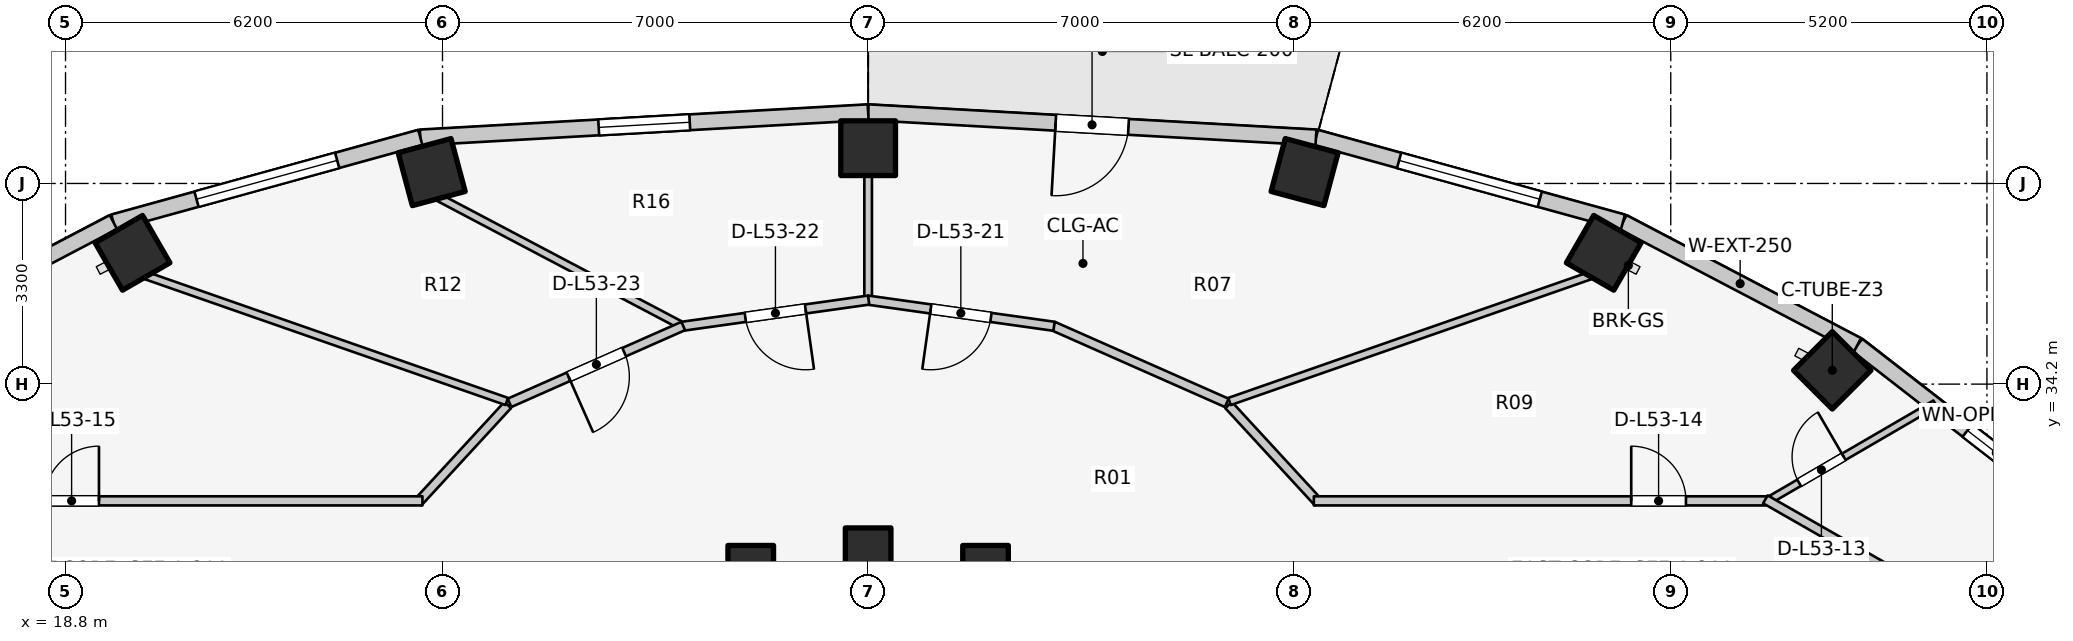
"""IFC4 building model, lengths in metres.
Left out: names, types, materials, properties, quantities, classifications, styles, units other than length and angle.
Written with IfcOpenShell. Run it as: python <this file> out.ifc"""

import sys

from ifc_helpers import new_model, si_unit, direction, frame, frame_2d, origin, origin_2d, place, context, subcontext, project, spatial, rectangle, extrude, element, fill, save


model = new_model("IFC4")
c1 = context("Model", 3, precision=1e-05, world=origin(), true_north=direction((0.0, 1.0)))
c2 = subcontext(c1, "Body", "Model", "MODEL_VIEW")
j1 = project(units=[si_unit("LENGTHUNIT", "METRE"), si_unit("PLANEANGLEUNIT", "RADIAN")], contexts=[c1])
p1 = place(None, origin())
s1 = spatial("IfcSite", under=j1, at=p1, CompositionType="ELEMENT")
p2 = place(p1, origin())
s2 = spatial("IfcBuilding", under=s1, at=p2, CompositionType="ELEMENT")
p3 = place(p2, frame((0.0, 0.0, 174.6)))
s3 = spatial("IfcBuildingStorey", under=s2, at=p3, CompositionType="ELEMENT", Elevation=174.6)
for number, where, z_axis, x_axis in (
    (1, (47.857, 34.427, 0.0), (0.0, 0.0, 1.0), (0.707, 0.707, 0.0)),
    (2, (44.098, 36.359, 0.0), (0.0, 0.0, 1.0), (0.5, 0.866, 0.0)),
):
    element("IfcColumn", number, at=place(p3, frame(where, z_axis=z_axis, x_axis=x_axis)), inside=s3, PredefinedType="COLUMN", context=c2, shape_type="SweptSolid", body=[
        extrude(rectangle(XDim=0.9, YDim=0.9, at=origin_2d()), origin(), (0.0, 0.0, 1.0), 3.1),
    ])
p4 = place(p3, frame((33.931, 31.172, 0.0), z_axis=(0.0, 0.0, 1.0), x_axis=(1.0, 0.0, 0.0)))
e3 = element("IfcColumn", 3, at=p4, inside=s3, PredefinedType="COLUMN", context=c2, shape_type="SweptSolid", body=[
    extrude(rectangle(XDim=0.75, YDim=0.75, at=origin_2d()), origin(), (0.0, 0.0, 1.0), 3.1),
])
p5 = place(p3, frame((39.178, 37.687, 0.0), z_axis=(0.0, 0.0, 1.0), x_axis=(0.258819045103, 0.965925826289, 0.0)))
e4 = element("IfcColumn", 4, at=p5, inside=s3, PredefinedType="COLUMN", context=c2, shape_type="SweptSolid", body=[
    extrude(rectangle(XDim=0.9, YDim=0.9, at=origin_2d()), origin(), (0.0, 0.0, 1.0), 3.1),
])
p6 = place(p3, frame((32.0, 31.46, 0.0), z_axis=(0.0, 0.0, 1.0), x_axis=(1.0, 0.0, 0.0)))
e5 = element("IfcColumn", 5, at=p6, inside=s3, PredefinedType="COLUMN", context=c2, shape_type="SweptSolid", body=[
    extrude(rectangle(XDim=0.75, YDim=0.75, at=origin_2d()), origin(), (0.0, 0.0, 1.0), 3.1),
])
p7 = place(p3, frame((32.0, 38.08, 0.0), z_axis=(0.0, 0.0, 1.0), x_axis=(0.0, 1.0, 0.0)))
e6 = element("IfcColumn", 6, at=p7, inside=s3, PredefinedType="COLUMN", context=c2, shape_type="SweptSolid", body=[
    extrude(rectangle(XDim=0.9, YDim=0.9, at=origin_2d()), origin(), (0.0, 0.0, 1.0), 3.1),
])
p8 = place(p3, frame((30.069, 31.172, 0.0), z_axis=(0.0, 0.0, 1.0), x_axis=(1.0, 0.0, 0.0)))
e7 = element("IfcColumn", 7, at=p8, inside=s3, PredefinedType="COLUMN", context=c2, shape_type="SweptSolid", body=[
    extrude(rectangle(XDim=0.75, YDim=0.75, at=origin_2d()), origin(), (0.0, 0.0, 1.0), 3.1),
])
for number, where, z_axis, x_axis in (
    (8, (24.822, 37.687, 0.0), (0.0, 0.0, 1.0), (-0.259, 0.966, 0.0)),
    (9, (19.902, 36.359, 0.0), (0.0, 0.0, 1.0), (-0.5, 0.866, 0.0)),
):
    element("IfcColumn", number, at=place(p3, frame(where, z_axis=z_axis, x_axis=x_axis)), inside=s3, PredefinedType="COLUMN", context=c2, shape_type="SweptSolid", body=[
        extrude(rectangle(XDim=0.9, YDim=0.9, at=origin_2d()), origin(), (0.0, 0.0, 1.0), 3.1),
    ])
p9 = place(p3, frame((51.619, 32.243, 0.0), z_axis=(0.0, 0.0, 1.0), x_axis=(-0.790185650662, 0.612867552973, 0.0)))
e10 = element("IfcWall", 10, at=p9, inside=s3, PredefinedType="STANDARD", context=c2, shape_type="SweptSolid", body=[
    extrude(rectangle(XDim=4.239, YDim=0.26, at=frame_2d((2.12, 0.0))), origin(), (0.0, 0.0, 1.0), 2.85),
])
p10 = place(p9, frame((0.749, 0.0, 0.75)))
e11 = element("IfcOpeningElement", 11, at=p10, cuts=e10, PredefinedType="OPENING", context=c2, shape_type="SweptSolid", body=[
    extrude(rectangle(XDim=1.2, YDim=1.5, at=frame_2d((0.6, 0.75))), frame((0.0, 0.14, 0.0), z_axis=(0.0, -1.0, 0.0), x_axis=(1.0, 0.0, 0.0)), (0.0, 0.0, 1.0), 0.28),
])
p11 = place(p3, frame((48.269, 34.842, 0.0), z_axis=(0.0, 0.0, 1.0), x_axis=(-0.885660265226, 0.464333818065, 0.0)))
e12 = element("IfcWall", 12, at=p11, inside=s3, PredefinedType="STANDARD", context=c2, shape_type="SweptSolid", body=[
    extrude(rectangle(XDim=4.354, YDim=0.26, at=frame_2d((2.177, 0.0))), origin(), (0.0, 0.0, 1.0), 2.85),
])
p12 = place(p3, frame((44.413, 36.863, 0.0), z_axis=(0.0, 0.0, 1.0), x_axis=(-0.963953455704, 0.26607092144, 0.0)))
e13 = element("IfcWall", 13, at=p12, inside=s3, PredefinedType="STANDARD", context=c2, shape_type="SweptSolid", body=[
    extrude(rectangle(XDim=5.237, YDim=0.26, at=frame_2d((2.618, 0.0))), origin(), (0.0, 0.0, 1.0), 2.85),
])
p13 = place(p12, frame((1.418, 0.0, 0.75)))
e14 = element("IfcOpeningElement", 14, at=p13, cuts=e13, PredefinedType="OPENING", context=c2, shape_type="SweptSolid", body=[
    extrude(rectangle(XDim=2.4, YDim=1.7, at=frame_2d((1.2, 0.85))), frame((0.0, 0.14, 0.0), z_axis=(0.0, -1.0, 0.0), x_axis=(1.0, 0.0, 0.0)), (0.0, 0.0, 1.0), 0.28),
])
p14 = place(p3, frame((39.365, 38.257, 0.0), z_axis=(0.0, 0.0, 1.0), x_axis=(-0.998417906562, 0.056228852534, 0.0)))
e15 = element("IfcWall", 15, at=p14, inside=s3, PredefinedType="STANDARD", context=c2, shape_type="SweptSolid", body=[
    extrude(rectangle(XDim=7.377, YDim=0.26, at=frame_2d((3.688, 0.0))), origin(), (0.0, 0.0, 1.0), 2.88),
])
p15 = place(p14, frame((3.088, 0.0, 0.0)))
e16 = element("IfcOpeningElement", 16, at=p15, cuts=e15, PredefinedType="OPENING", context=c2, shape_type="SweptSolid", body=[
    extrude(rectangle(XDim=1.2, YDim=2.2, at=frame_2d((0.6, 1.1))), frame((0.0, 0.14, 0.0), z_axis=(0.0, -1.0, 0.0), x_axis=(1.0, 0.0, 0.0)), (0.0, 0.0, 1.0), 0.28),
])
p16 = place(p3, frame((32.0, 38.671, 0.0), z_axis=(0.0, 0.0, 1.0), x_axis=(-0.998417906562, -0.056228852534, 0.0)))
e17 = element("IfcWall", 17, at=p16, inside=s3, PredefinedType="STANDARD", context=c2, shape_type="SweptSolid", body=[
    extrude(rectangle(XDim=7.377, YDim=0.26, at=frame_2d((3.688, 0.0))), origin(), (0.0, 0.0, 1.0), 2.85),
])
p17 = place(p16, frame((2.938, 0.0, 0.75)))
e18 = element("IfcOpeningElement", 18, at=p17, cuts=e17, PredefinedType="OPENING", context=c2, shape_type="SweptSolid", body=[
    extrude(rectangle(XDim=1.5, YDim=1.6, at=frame_2d((0.75, 0.8))), frame((0.0, 0.14, 0.0), z_axis=(0.0, -1.0, 0.0), x_axis=(1.0, 0.0, 0.0)), (0.0, 0.0, 1.0), 0.28),
])
p18 = place(p3, frame((24.635, 38.257, 0.0), z_axis=(0.0, 0.0, 1.0), x_axis=(-0.963953455704, -0.26607092144, 0.0)))
e19 = element("IfcWall", 19, at=p18, inside=s3, PredefinedType="STANDARD", context=c2, shape_type="SweptSolid", body=[
    extrude(rectangle(XDim=5.237, YDim=0.26, at=frame_2d((2.618, 0.0))), origin(), (0.0, 0.0, 1.0), 2.85),
])
p19 = place(p18, frame((1.418, 0.0, 0.75)))
e20 = element("IfcOpeningElement", 20, at=p19, cuts=e19, PredefinedType="OPENING", context=c2, shape_type="SweptSolid", body=[
    extrude(rectangle(XDim=2.4, YDim=1.7, at=frame_2d((1.2, 0.85))), frame((0.0, 0.14, 0.0), z_axis=(0.0, -1.0, 0.0), x_axis=(1.0, 0.0, 0.0)), (0.0, 0.0, 1.0), 0.28),
])
p20 = place(p3, frame((19.587, 36.863, 0.0), z_axis=(0.0, 0.0, 1.0), x_axis=(-0.885660265226, -0.464333818065, 0.0)))
e21 = element("IfcWall", 21, at=p20, inside=s3, PredefinedType="STANDARD", context=c2, shape_type="SweptSolid", body=[
    extrude(rectangle(XDim=4.354, YDim=0.26, at=frame_2d((2.177, 0.0))), origin(), (0.0, 0.0, 1.0), 2.85),
])
p21 = place(p3, frame((46.757, 32.255, 0.0), z_axis=(0.0, 0.0, 1.0), x_axis=(0.864408655832, 0.502789892224, 0.0)))
e22 = element("IfcWall", 22, at=p21, inside=s3, PredefinedType="MOVABLE", context=c2, shape_type="SweptSolid", body=[
    extrude(rectangle(XDim=3.23, YDim=0.12, at=frame_2d((1.615, 0.0))), origin(), (0.0, 0.0, 1.0), 2.22),
])
p22 = place(p21, frame((0.641, 0.0, 0.0)))
e23 = element("IfcOpeningElement", 23, at=p22, cuts=e22, PredefinedType="OPENING", context=c2, shape_type="SweptSolid", body=[
    extrude(rectangle(XDim=0.85, YDim=2.05, at=frame_2d((0.425, 1.025))), frame((0.0, 0.07, 0.0), z_axis=(0.0, -1.0, 0.0), x_axis=(1.0, 0.0, 0.0)), (0.0, 0.0, 1.0), 0.14),
])
p23 = place(p3, frame((37.928, 33.856, 0.0), z_axis=(0.0, 0.0, 1.0), x_axis=(0.677579737957, -0.735449317567, 0.0)))
e24 = element("IfcWall", 24, at=p23, inside=s3, PredefinedType="PARTITIONING", context=c2, shape_type="SweptSolid", body=[
    extrude(rectangle(XDim=2.173, YDim=0.15, at=frame_2d((1.086, 0.0))), origin(), (0.0, 0.0, 1.0), 2.299),
])
p24 = place(p3, frame((39.33, 32.28, 0.0), z_axis=(0.0, 0.0, 1.0), x_axis=(1.0, 0.0, 0.0)))
e25 = element("IfcWall", 25, at=p24, inside=s3, PredefinedType="PARTITIONING", context=c2, shape_type="SweptSolid", body=[
    extrude(rectangle(XDim=7.52, YDim=0.15, at=frame_2d((3.76, 0.0))), origin(), (0.0, 0.0, 1.0), 2.299),
])
p25 = place(p24, frame((5.22, 0.0, 0.0)))
e26 = element("IfcOpeningElement", 26, at=p25, cuts=e25, PredefinedType="OPENING", context=c2, shape_type="SweptSolid", body=[
    extrude(rectangle(XDim=0.9, YDim=2.1, at=frame_2d((0.45, 1.05))), frame((0.0, 0.085, 0.0), z_axis=(0.0, -1.0, 0.0), x_axis=(1.0, 0.0, 0.0)), (0.0, 0.0, 1.0), 0.17),
])
p26 = place(p3, frame((46.757, 32.305, 0.0), z_axis=(0.0, 0.0, 1.0), x_axis=(0.867991349648, -0.496579315857, 0.0)))
e27 = element("IfcWall", 27, at=p26, inside=s3, PredefinedType="PARTITIONING", context=c2, shape_type="SweptSolid", body=[
    extrude(rectangle(XDim=2.567, YDim=0.15, at=frame_2d((1.283, 0.0))), origin(), (0.0, 0.0, 1.0), 2.22),
])
p27 = place(p3, frame((26.072, 33.856, 0.0), z_axis=(0.0, 0.0, 1.0), x_axis=(-0.677579737957, -0.735449317567, 0.0)))
e28 = element("IfcWall", 28, at=p27, inside=s3, PredefinedType="PARTITIONING", context=c2, shape_type="SweptSolid", body=[
    extrude(rectangle(XDim=2.173, YDim=0.15, at=frame_2d((1.086, 0.0))), origin(), (0.0, 0.0, 1.0), 2.299),
])
p28 = place(p3, frame((17.15, 32.28, 0.0), z_axis=(0.0, 0.0, 1.0), x_axis=(1.0, 0.0, 0.0)))
e29 = element("IfcWall", 29, at=p28, inside=s3, PredefinedType="PARTITIONING", context=c2, shape_type="SweptSolid", body=[
    extrude(rectangle(XDim=7.52, YDim=0.15, at=frame_2d((3.76, 0.0))), origin(), (0.0, 0.0, 1.0), 2.299),
])
p29 = place(p28, frame((1.3, 0.0, 0.0)))
e30 = element("IfcOpeningElement", 30, at=p29, cuts=e29, PredefinedType="OPENING", context=c2, shape_type="SweptSolid", body=[
    extrude(rectangle(XDim=0.9, YDim=2.1, at=frame_2d((0.45, 1.05))), frame((0.0, 0.085, 0.0), z_axis=(0.0, -1.0, 0.0), x_axis=(1.0, 0.0, 0.0)), (0.0, 0.0, 1.0), 0.17),
])
p30 = place(p3, frame((37.943, 33.914, 0.0), z_axis=(0.0, 0.0, 1.0), x_axis=(0.944182779284, 0.329422038278, 0.0)))
e31 = element("IfcWall", 31, at=p30, inside=s3, PredefinedType="PARTITIONING", context=c2, shape_type="SweptSolid", body=[
    extrude(rectangle(XDim=6.291, YDim=0.125, at=frame_2d((3.146, 0.0))), origin(), (0.0, 0.0, 1.0), 2.299),
])
p31 = place(p3, frame((32.0, 35.637, 0.0), z_axis=(0.0, 0.0, 1.0), x_axis=(0.0, 1.0, 0.0)))
e32 = element("IfcWall", 32, at=p31, inside=s3, PredefinedType="PARTITIONING", context=c2, shape_type="SweptSolid", body=[
    extrude(rectangle(XDim=2.013, YDim=0.125, at=frame_2d((1.006, 0.0))), origin(), (0.0, 0.0, 1.0), 2.299),
])
p32 = place(p3, frame((28.902, 35.179, 0.0), z_axis=(0.0, 0.0, 1.0), x_axis=(-0.884576855896, 0.466394453241, 0.0)))
e33 = element("IfcWall", 33, at=p32, inside=s3, PredefinedType="PARTITIONING", context=c2, shape_type="SweptSolid", body=[
    extrude(rectangle(XDim=4.487, YDim=0.125, at=frame_2d((2.243, 0.0))), origin(), (0.0, 0.0, 1.0), 2.299),
])
p33 = place(p3, frame((26.057, 33.914, 0.0), z_axis=(0.0, 0.0, 1.0), x_axis=(-0.944182779284, 0.329422038278, 0.0)))
e34 = element("IfcWall", 34, at=p33, inside=s3, PredefinedType="PARTITIONING", context=c2, shape_type="SweptSolid", body=[
    extrude(rectangle(XDim=6.291, YDim=0.125, at=frame_2d((3.146, 0.0))), origin(), (0.0, 0.0, 1.0), 2.299),
])
p34 = place(p3, frame((37.898, 33.892, 0.0), z_axis=(0.0, 0.0, 1.0), x_axis=(-0.914519212393, 0.40454247016, 0.0)))
e35 = element("IfcWall", 35, at=p34, inside=s3, PredefinedType="PARTITIONING", context=c2, shape_type="SweptSolid", body=[
    extrude(rectangle(XDim=3.124, YDim=0.15, at=frame_2d((1.562, 0.0))), origin(), (0.0, 0.0, 1.0), 2.299),
])
p35 = place(p3, frame((35.057, 35.151, 0.0), z_axis=(0.0, 0.0, 1.0), x_axis=(-0.990254709652, 0.13926812274, 0.0)))
e36 = element("IfcWall", 36, at=p35, inside=s3, PredefinedType="PARTITIONING", context=c2, shape_type="SweptSolid", body=[
    extrude(rectangle(XDim=3.096, YDim=0.15, at=frame_2d((1.548, 0.0))), origin(), (0.0, 0.0, 1.0), 2.299),
])
p36 = place(p35, frame((1.048, 0.0, 0.0)))
e37 = element("IfcOpeningElement", 37, at=p36, cuts=e36, PredefinedType="OPENING", context=c2, shape_type="SweptSolid", body=[
    extrude(rectangle(XDim=1.0, YDim=2.1, at=frame_2d((0.5, 1.05))), frame((0.0, 0.085, 0.0), z_axis=(0.0, -1.0, 0.0), x_axis=(1.0, 0.0, 0.0)), (0.0, 0.0, 1.0), 0.17),
])
p37 = place(p3, frame((32.008, 35.582, 0.0), z_axis=(0.0, 0.0, 1.0), x_axis=(-0.990254709652, -0.13926812274, 0.0)))
e38 = element("IfcWall", 38, at=p37, inside=s3, PredefinedType="PARTITIONING", context=c2, shape_type="SweptSolid", body=[
    extrude(rectangle(XDim=3.096, YDim=0.15, at=frame_2d((1.548, 0.0))), origin(), (0.0, 0.0, 1.0), 2.299),
])
p38 = place(p37, frame((1.048, 0.0, 0.0)))
e39 = element("IfcOpeningElement", 39, at=p38, cuts=e38, PredefinedType="OPENING", context=c2, shape_type="SweptSolid", body=[
    extrude(rectangle(XDim=1.0, YDim=2.1, at=frame_2d((0.5, 1.05))), frame((0.0, 0.085, 0.0), z_axis=(0.0, -1.0, 0.0), x_axis=(1.0, 0.0, 0.0)), (0.0, 0.0, 1.0), 0.17),
])
p39 = place(p3, frame((28.958, 35.156, 0.0), z_axis=(0.0, 0.0, 1.0), x_axis=(-0.914519212393, -0.40454247016, 0.0)))
e40 = element("IfcWall", 40, at=p39, inside=s3, PredefinedType="PARTITIONING", context=c2, shape_type="SweptSolid", body=[
    extrude(rectangle(XDim=3.124, YDim=0.15, at=frame_2d((1.562, 0.0))), origin(), (0.0, 0.0, 1.0), 2.299),
])
p40 = place(p39, frame((1.062, 0.0, 0.0)))
e41 = element("IfcOpeningElement", 41, at=p40, cuts=e40, PredefinedType="OPENING", context=c2, shape_type="SweptSolid", body=[
    extrude(rectangle(XDim=1.0, YDim=2.1, at=frame_2d((0.5, 1.05))), frame((0.0, 0.085, 0.0), z_axis=(0.0, -1.0, 0.0), x_axis=(1.0, 0.0, 0.0)), (0.0, 0.0, 1.0), 0.17),
])
p41 = place(p10, origin())
e42 = element("IfcWindow", 42, at=p41, inside=s3, PartitioningType="SINGLE_PANEL", PredefinedType="WINDOW", context=c2, shape_type="SweptSolid", body=[
    extrude(rectangle(XDim=1.2, YDim=1.5, at=frame_2d((0.6, 0.75))), frame((0.0, 0.03, 0.0), z_axis=(0.0, -1.0, 0.0), x_axis=(1.0, 0.0, 0.0)), (0.0, 0.0, 1.0), 0.06),
])
fill(e11, e42)
p42 = place(p13, origin())
e43 = element("IfcWindow", 43, at=p42, inside=s3, PartitioningType="SINGLE_PANEL", PredefinedType="WINDOW", context=c2, shape_type="SweptSolid", body=[
    extrude(rectangle(XDim=2.4, YDim=1.7, at=frame_2d((1.2, 0.85))), frame((0.0, 0.03, 0.0), z_axis=(0.0, -1.0, 0.0), x_axis=(1.0, 0.0, 0.0)), (0.0, 0.0, 1.0), 0.06),
])
fill(e14, e43)
p43 = place(p15, origin())
e44 = element("IfcDoor", 44, at=p43, inside=s3, OperationType="SINGLE_SWING_RIGHT", PredefinedType="DOOR", context=c2, shape_type="SweptSolid", body=[
    extrude(rectangle(XDim=1.2, YDim=2.2, at=frame_2d((0.6, 1.1))), frame((0.0, 0.025, 0.0), z_axis=(0.0, -1.0, 0.0), x_axis=(1.0, 0.0, 0.0)), (0.0, 0.0, 1.0), 0.05),
])
fill(e16, e44)
p44 = place(p17, origin())
e45 = element("IfcWindow", 45, at=p44, inside=s3, PartitioningType="SINGLE_PANEL", PredefinedType="WINDOW", context=c2, shape_type="SweptSolid", body=[
    extrude(rectangle(XDim=1.5, YDim=1.6, at=frame_2d((0.75, 0.8))), frame((0.0, 0.03, 0.0), z_axis=(0.0, -1.0, 0.0), x_axis=(1.0, 0.0, 0.0)), (0.0, 0.0, 1.0), 0.06),
])
fill(e18, e45)
p45 = place(p19, origin())
e46 = element("IfcWindow", 46, at=p45, inside=s3, PartitioningType="SINGLE_PANEL", PredefinedType="WINDOW", context=c2, shape_type="SweptSolid", body=[
    extrude(rectangle(XDim=2.4, YDim=1.7, at=frame_2d((1.2, 0.85))), frame((0.0, 0.03, 0.0), z_axis=(0.0, -1.0, 0.0), x_axis=(1.0, 0.0, 0.0)), (0.0, 0.0, 1.0), 0.06),
])
fill(e20, e46)
p46 = place(p22, origin())
e47 = element("IfcDoor", 47, at=p46, inside=s3, OperationType="SINGLE_SWING_RIGHT", PredefinedType="DOOR", context=c2, shape_type="SweptSolid", body=[
    extrude(rectangle(XDim=0.85, YDim=2.05, at=frame_2d((0.425, 1.025))), frame((0.0, 0.025, 0.0), z_axis=(0.0, -1.0, 0.0), x_axis=(1.0, 0.0, 0.0)), (0.0, 0.0, 1.0), 0.05),
])
fill(e23, e47)
p47 = place(p25, origin())
e48 = element("IfcDoor", 48, at=p47, inside=s3, OperationType="SINGLE_SWING_LEFT", PredefinedType="DOOR", context=c2, shape_type="SweptSolid", body=[
    extrude(rectangle(XDim=0.9, YDim=2.1, at=frame_2d((0.45, 1.05))), frame((0.0, 0.025, 0.0), z_axis=(0.0, -1.0, 0.0), x_axis=(1.0, 0.0, 0.0)), (0.0, 0.0, 1.0), 0.05),
])
fill(e26, e48)
p48 = place(p29, origin())
e49 = element("IfcDoor", 49, at=p48, inside=s3, OperationType="SINGLE_SWING_RIGHT", PredefinedType="DOOR", context=c2, shape_type="SweptSolid", body=[
    extrude(rectangle(XDim=0.9, YDim=2.1, at=frame_2d((0.45, 1.05))), frame((0.0, 0.025, 0.0), z_axis=(0.0, -1.0, 0.0), x_axis=(1.0, 0.0, 0.0)), (0.0, 0.0, 1.0), 0.05),
])
fill(e30, e49)
p49 = place(p36, origin())
e50 = element("IfcDoor", 50, at=p49, inside=s3, OperationType="SINGLE_SWING_RIGHT", PredefinedType="DOOR", context=c2, shape_type="SweptSolid", body=[
    extrude(rectangle(XDim=1.0, YDim=2.1, at=frame_2d((0.5, 1.05))), frame((0.0, 0.025, 0.0), z_axis=(0.0, -1.0, 0.0), x_axis=(1.0, 0.0, 0.0)), (0.0, 0.0, 1.0), 0.05),
])
fill(e37, e50)
p50 = place(p38, origin())
e51 = element("IfcDoor", 51, at=p50, inside=s3, OperationType="SINGLE_SWING_LEFT", PredefinedType="DOOR", context=c2, shape_type="SweptSolid", body=[
    extrude(rectangle(XDim=1.0, YDim=2.1, at=frame_2d((0.5, 1.05))), frame((0.0, 0.025, 0.0), z_axis=(0.0, -1.0, 0.0), x_axis=(1.0, 0.0, 0.0)), (0.0, 0.0, 1.0), 0.05),
])
fill(e39, e51)
p51 = place(p40, origin())
e52 = element("IfcDoor", 52, at=p51, inside=s3, OperationType="SINGLE_SWING_RIGHT", PredefinedType="DOOR", context=c2, shape_type="SweptSolid", body=[
    extrude(rectangle(XDim=1.0, YDim=2.1, at=frame_2d((0.5, 1.05))), frame((0.0, 0.025, 0.0), z_axis=(0.0, -1.0, 0.0), x_axis=(1.0, 0.0, 0.0)), (0.0, 0.0, 1.0), 0.05),
])
fill(e41, e52)
save(model, sys.argv[1])
